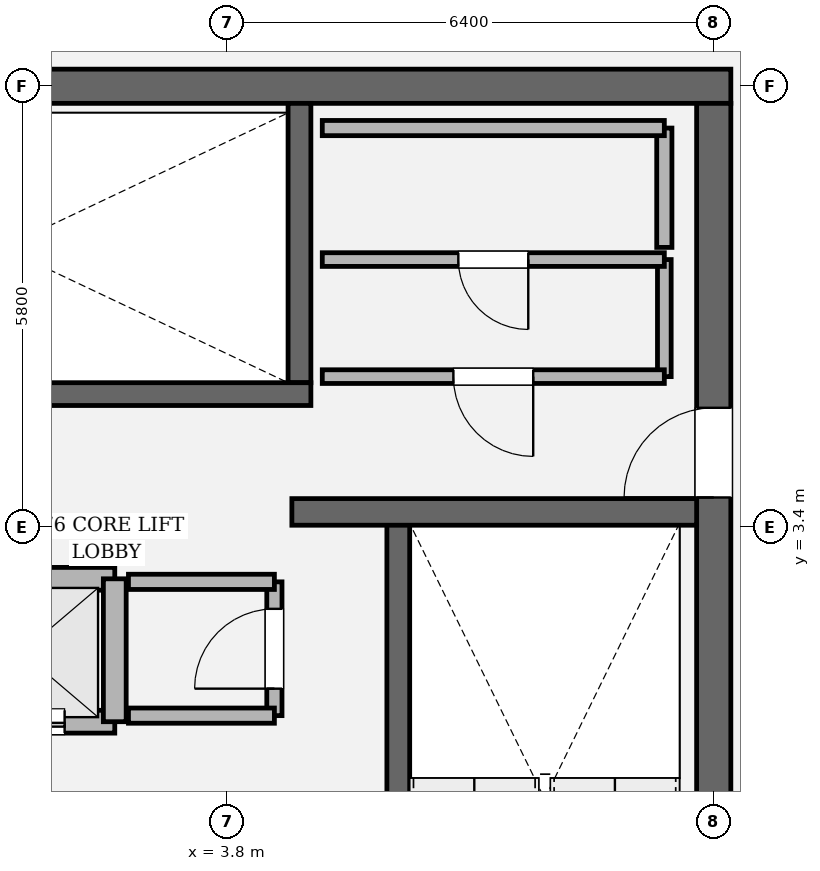
"""IFC4 building model, lengths in metres.
Left out: names, types, materials, properties, quantities, classifications, styles, units other than length and angle.
Written with IfcOpenShell. Run it as: python <this file> out.ifc"""

import sys

from ifc_helpers import new_model, si_unit, direction, frame, frame_2d, origin, place, context, subcontext, project, spatial, rectangle, extrude, element, fill, save


model = new_model("IFC4")
c1 = context("Model", 3, precision=1e-05, world=origin(), true_north=direction((0.0, 1.0)))
c2 = subcontext(c1, "Body", "Model", "MODEL_VIEW")
j1 = project(units=[si_unit("LENGTHUNIT", "METRE"), si_unit("PLANEANGLEUNIT", "RADIAN")], contexts=[c1])
p1 = place(None, origin())
s1 = spatial("IfcSite", under=j1, at=p1, CompositionType="ELEMENT")
p2 = place(p1, origin())
s2 = spatial("IfcBuilding", under=s1, at=p2, CompositionType="ELEMENT")
p3 = place(p2, frame((0.0, 0.0, 321.6)))
s3 = spatial("IfcBuildingStorey", under=s2, at=p3, CompositionType="ELEMENT", Elevation=321.6)
p4 = place(p3, frame((-10.425, 9.2, 0.0), z_axis=(0.0, 0.0, 1.0), x_axis=(1.0, 0.0, 0.0)))
e1 = element("IfcWall", 1, at=p4, inside=s3, PredefinedType="SHEAR", context=c2, shape_type="SweptSolid", body=[
    extrude(rectangle(XDim=20.85, YDim=0.45, at=frame_2d((10.425, 0.0))), origin(), (0.0, 0.0, 1.0), 4.2),
])
p5 = place(p3, frame((10.2, 8.975, 0.0), z_axis=(0.0, 0.0, 1.0), x_axis=(0.0, -1.0, 0.0)))
e2 = element("IfcWall", 2, at=p5, inside=s3, PredefinedType="SHEAR", context=c2, shape_type="SweptSolid", body=[
    extrude(rectangle(XDim=17.95, YDim=0.45, at=frame_2d((8.975, 0.0))), origin(), (0.0, 0.0, 1.0), 4.2),
])
p6 = place(p5, frame((4.005, 0.0, 0.0)))
e3 = element("IfcOpeningElement", 3, at=p6, cuts=e2, PredefinedType="OPENING", context=c2, shape_type="SweptSolid", body=[
    extrude(rectangle(XDim=1.18, YDim=2.2, at=frame_2d((0.59, 1.1))), frame((0.0, 0.235, 0.0), z_axis=(0.0, -1.0, 0.0), x_axis=(1.0, 0.0, 0.0)), (0.0, 0.0, 1.0), 0.47),
])
p7 = place(p3, frame((6.05, 3.45, 0.0), z_axis=(0.0, 0.0, 1.0), x_axis=(0.0, -1.0, 0.0)))
e4 = element("IfcWall", 4, at=p7, inside=s3, PredefinedType="SOLIDWALL", context=c2, shape_type="SweptSolid", body=[
    extrude(rectangle(XDim=8.95, YDim=0.3, at=frame_2d((4.475, 0.0))), origin(), (0.0, 0.0, 1.0), 4.2),
])
p8 = place(p3, frame((4.75, 8.975, 0.0), z_axis=(0.0, 0.0, 1.0), x_axis=(0.0, -1.0, 0.0)))
e5 = element("IfcWall", 5, at=p8, inside=s3, PredefinedType="SOLIDWALL", context=c2, shape_type="SweptSolid", body=[
    extrude(rectangle(XDim=3.675, YDim=0.3, at=frame_2d((1.837, 0.0))), origin(), (0.0, 0.0, 1.0), 4.2),
])
p9 = place(p3, frame((-4.9, 5.15, 0.0), z_axis=(0.0, 0.0, 1.0), x_axis=(1.0, 0.0, 0.0)))
e6 = element("IfcWall", 6, at=p9, inside=s3, PredefinedType="SOLIDWALL", context=c2, shape_type="SweptSolid", body=[
    extrude(rectangle(XDim=9.8, YDim=0.3, at=frame_2d((4.9, 0.0))), origin(), (0.0, 0.0, 1.0), 4.2),
])
p10 = place(p9, frame((0.56, 0.0, 0.0)))
e7 = element("IfcOpeningElement", 7, at=p10, cuts=e6, PredefinedType="OPENING", context=c2, shape_type="SweptSolid", body=[
    extrude(rectangle(XDim=1.18, YDim=2.2, at=frame_2d((0.59, 1.1))), frame((0.0, 0.16, 0.0), z_axis=(0.0, -1.0, 0.0), x_axis=(1.0, 0.0, 0.0)), (0.0, 0.0, 1.0), 0.32),
])
p11 = place(p3, frame((4.65, 3.6, 0.0), z_axis=(0.0, 0.0, 1.0), x_axis=(1.0, 0.0, 0.0)))
e8 = element("IfcWall", 8, at=p11, inside=s3, PredefinedType="SOLIDWALL", context=c2, shape_type="SweptSolid", body=[
    extrude(rectangle(XDim=5.325, YDim=0.35, at=frame_2d((2.663, 0.0))), origin(), (0.0, 0.0, 1.0), 4.2),
])
p12 = place(p3, frame((-2.32, 0.84, 0.0), z_axis=(0.0, 0.0, 1.0), x_axis=(1.0, 0.0, 0.0)))
e9 = element("IfcWall", 9, at=p12, inside=s3, PredefinedType="SOLIDWALL", context=c2, shape_type="SweptSolid", body=[
    extrude(rectangle(XDim=4.64, YDim=0.3, at=frame_2d((2.32, 0.0))), origin(), (0.0, 0.0, 1.0), 4.0),
])
p13 = place(p12, frame((0.66, 0.0, 0.0)))
e10 = element("IfcOpeningElement", 10, at=p13, cuts=e9, PredefinedType="OPENING", context=c2, shape_type="SweptSolid", body=[
    extrude(rectangle(XDim=1.12, YDim=2.25, at=frame_2d((0.56, 1.125))), frame((0.0, 0.16, 0.0), z_axis=(0.0, -1.0, 0.0), x_axis=(1.0, 0.0, 0.0)), (0.0, 0.0, 1.0), 0.32),
])
p14 = place(p12, frame((2.86, 0.0, 0.0)))
e11 = element("IfcOpeningElement", 11, at=p14, cuts=e9, PredefinedType="OPENING", context=c2, shape_type="SweptSolid", body=[
    extrude(rectangle(XDim=1.12, YDim=2.25, at=frame_2d((0.56, 1.125))), frame((0.0, 0.16, 0.0), z_axis=(0.0, -1.0, 0.0), x_axis=(1.0, 0.0, 0.0)), (0.0, 0.0, 1.0), 0.32),
])
p15 = place(p3, frame((-2.32, 2.72, 0.0), z_axis=(0.0, 0.0, 1.0), x_axis=(1.0, 0.0, 0.0)))
e12 = element("IfcWall", 12, at=p15, inside=s3, PredefinedType="SOLIDWALL", context=c2, shape_type="SweptSolid", body=[
    extrude(rectangle(XDim=4.64, YDim=0.3, at=frame_2d((2.32, 0.0))), origin(), (0.0, 0.0, 1.0), 4.0),
])
p16 = place(p3, frame((2.32, 0.84, 0.0), z_axis=(0.0, 0.0, 1.0), x_axis=(0.0, 1.0, 0.0)))
e13 = element("IfcWall", 13, at=p16, inside=s3, PredefinedType="SOLIDWALL", context=c2, shape_type="SweptSolid", body=[
    extrude(rectangle(XDim=1.88, YDim=0.3, at=frame_2d((0.94, 0.0))), origin(), (0.0, 0.0, 1.0), 4.0),
])
p17 = place(p3, frame((4.42, 0.92, 0.0), z_axis=(0.0, 0.0, 1.0), x_axis=(0.0, 1.0, 0.0)))
e14 = element("IfcWall", 14, at=p17, inside=s3, PredefinedType="SOLIDWALL", context=c2, shape_type="SweptSolid", body=[
    extrude(rectangle(XDim=1.76, YDim=0.2, at=frame_2d((0.88, 0.0))), origin(), (0.0, 0.0, 1.0), 4.0),
])
p18 = place(p17, frame((0.355, 0.0, 0.0)))
e15 = element("IfcOpeningElement", 15, at=p18, cuts=e14, PredefinedType="OPENING", context=c2, shape_type="SweptSolid", body=[
    extrude(rectangle(XDim=1.05, YDim=2.2, at=frame_2d((0.525, 1.1))), frame((0.0, 0.11, 0.0), z_axis=(0.0, -1.0, 0.0), x_axis=(1.0, 0.0, 0.0)), (0.0, 0.0, 1.0), 0.22),
])
for number, where, z_axis, x_axis in (
    (16, (4.42, 2.68, 0.0), (0.0, 0.0, 1.0), (-1.0, 0.0, 0.0)),
    (17, (2.5, 0.92, 0.0), (0.0, 0.0, 1.0), (1.0, 0.0, 0.0)),
):
    element("IfcWall", number, at=place(p3, frame(where, z_axis=z_axis, x_axis=x_axis)), inside=s3, PredefinedType="SOLIDWALL", context=c2, shape_type="SweptSolid", body=[
        extrude(rectangle(XDim=1.92, YDim=0.2, at=frame_2d((0.96, 0.0))), origin(), (0.0, 0.0, 1.0), 4.0),
    ])
p19 = place(p3, frame((9.55, 5.38, 0.0), z_axis=(0.0, 0.0, 1.0), x_axis=(0.0, 1.0, 0.0)))
e18 = element("IfcWall", 18, at=p19, inside=s3, PredefinedType="PARTITIONING", context=c2, shape_type="SweptSolid", body=[
    extrude(rectangle(XDim=1.54, YDim=0.18, at=frame_2d((0.77, 0.0))), origin(), (0.0, 0.0, 1.0), 4.0),
])
p20 = place(p3, frame((9.55, 6.92, 0.0), z_axis=(0.0, 0.0, 1.0), x_axis=(-1.0, 0.0, 0.0)))
e19 = element("IfcWall", 19, at=p20, inside=s3, PredefinedType="PARTITIONING", context=c2, shape_type="SweptSolid", body=[
    extrude(rectangle(XDim=4.5, YDim=0.18, at=frame_2d((2.25, 0.0))), origin(), (0.0, 0.0, 1.0), 4.0),
])
p21 = place(p20, frame((1.79, 0.0, 0.0)))
e20 = element("IfcOpeningElement", 20, at=p21, cuts=e19, PredefinedType="OPENING", context=c2, shape_type="SweptSolid", body=[
    extrude(rectangle(XDim=0.92, YDim=2.1, at=frame_2d((0.46, 1.05))), frame((0.0, 0.1, 0.0), z_axis=(0.0, -1.0, 0.0), x_axis=(1.0, 0.0, 0.0)), (0.0, 0.0, 1.0), 0.2),
])
p22 = place(p3, frame((5.05, 5.38, 0.0), z_axis=(0.0, 0.0, 1.0), x_axis=(1.0, 0.0, 0.0)))
e21 = element("IfcWall", 21, at=p22, inside=s3, PredefinedType="PARTITIONING", context=c2, shape_type="SweptSolid", body=[
    extrude(rectangle(XDim=4.5, YDim=0.18, at=frame_2d((2.25, 0.0))), origin(), (0.0, 0.0, 1.0), 4.0),
])
p23 = place(p22, frame((1.725, 0.0, 0.0)))
e22 = element("IfcOpeningElement", 22, at=p23, cuts=e21, PredefinedType="OPENING", context=c2, shape_type="SweptSolid", body=[
    extrude(rectangle(XDim=1.05, YDim=2.2, at=frame_2d((0.525, 1.1))), frame((0.0, 0.1, 0.0), z_axis=(0.0, -1.0, 0.0), x_axis=(1.0, 0.0, 0.0)), (0.0, 0.0, 1.0), 0.2),
])
p24 = place(p3, frame((9.55, 7.08, 0.0), z_axis=(0.0, 0.0, 1.0), x_axis=(0.0, 1.0, 0.0)))
e23 = element("IfcWall", 23, at=p24, inside=s3, PredefinedType="SOLIDWALL", context=c2, shape_type="SweptSolid", body=[
    extrude(rectangle(XDim=1.57, YDim=0.2, at=frame_2d((0.785, 0.0))), origin(), (0.0, 0.0, 1.0), 4.0),
])
p25 = place(p3, frame((9.55, 8.65, 0.0), z_axis=(0.0, 0.0, 1.0), x_axis=(-1.0, 0.0, 0.0)))
e24 = element("IfcWall", 24, at=p25, inside=s3, PredefinedType="SOLIDWALL", context=c2, shape_type="SweptSolid", body=[
    extrude(rectangle(XDim=4.5, YDim=0.2, at=frame_2d((2.25, 0.0))), origin(), (0.0, 0.0, 1.0), 4.0),
])
p26 = place(p6, origin())
e25 = element("IfcDoor", 25, at=p26, inside=s3, OperationType="SINGLE_SWING_RIGHT", PredefinedType="DOOR", context=c2, shape_type="SweptSolid", body=[
    extrude(rectangle(XDim=1.18, YDim=2.2, at=frame_2d((0.59, 1.1))), frame((0.0, 0.025, 0.0), z_axis=(0.0, -1.0, 0.0), x_axis=(1.0, 0.0, 0.0)), (0.0, 0.0, 1.0), 0.05),
])
fill(e3, e25)
p27 = place(p14, origin())
e26 = element("IfcDoor", 26, at=p27, inside=s3, OperationType="DOUBLE_DOOR_SLIDING", PredefinedType="DOOR", context=c2, shape_type="SweptSolid", body=[
    extrude(rectangle(XDim=1.12, YDim=2.25, at=frame_2d((0.56, 1.125))), frame((0.0, 0.025, 0.0), z_axis=(0.0, -1.0, 0.0), x_axis=(1.0, 0.0, 0.0)), (0.0, 0.0, 1.0), 0.05),
])
fill(e11, e26)
p28 = place(p18, origin())
e27 = element("IfcDoor", 27, at=p28, inside=s3, OperationType="SINGLE_SWING_LEFT", PredefinedType="DOOR", context=c2, shape_type="SweptSolid", body=[
    extrude(rectangle(XDim=1.05, YDim=2.2, at=frame_2d((0.525, 1.1))), frame((0.0, 0.025, 0.0), z_axis=(0.0, -1.0, 0.0), x_axis=(1.0, 0.0, 0.0)), (0.0, 0.0, 1.0), 0.05),
])
fill(e15, e27)
p29 = place(p23, origin())
e28 = element("IfcDoor", 28, at=p29, inside=s3, OperationType="SINGLE_SWING_RIGHT", PredefinedType="DOOR", context=c2, shape_type="SweptSolid", body=[
    extrude(rectangle(XDim=1.05, YDim=2.2, at=frame_2d((0.525, 1.1))), frame((0.0, 0.025, 0.0), z_axis=(0.0, -1.0, 0.0), x_axis=(1.0, 0.0, 0.0)), (0.0, 0.0, 1.0), 0.05),
])
fill(e22, e28)
p30 = place(p21, origin())
e29 = element("IfcDoor", 29, at=p30, inside=s3, OperationType="SINGLE_SWING_LEFT", PredefinedType="DOOR", context=c2, shape_type="SweptSolid", body=[
    extrude(rectangle(XDim=0.92, YDim=2.1, at=frame_2d((0.46, 1.05))), frame((0.0, 0.025, 0.0), z_axis=(0.0, -1.0, 0.0), x_axis=(1.0, 0.0, 0.0)), (0.0, 0.0, 1.0), 0.05),
])
fill(e20, e29)
save(model, sys.argv[1])
